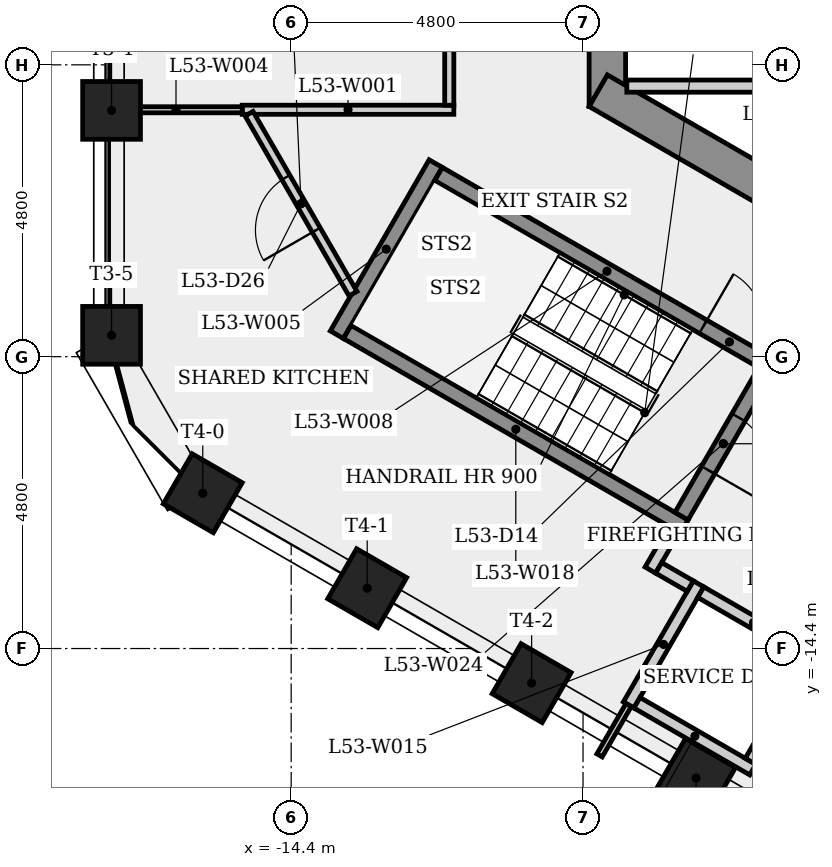
"""IFC4 building model, lengths in metres.
Left out: names, types, materials, properties, quantities, classifications, styles, units other than length and angle.
Written with IfcOpenShell. Run it as: python <this file> out.ifc"""

import sys

from ifc_helpers import new_model, si_unit, direction, frame, frame_2d, origin, origin_2d, place, context, subcontext, project, spatial, rectangle, extrude, element, fill, save


model = new_model("IFC4")
c1 = context("Model", 3, precision=1e-05, world=origin(), true_north=direction((0.0, 1.0)))
c2 = subcontext(c1, "Body", "Model", "MODEL_VIEW")
j1 = project(units=[si_unit("LENGTHUNIT", "METRE"), si_unit("PLANEANGLEUNIT", "RADIAN")], contexts=[c1])
p1 = place(None, origin())
s1 = spatial("IfcSite", under=j1, at=p1, CompositionType="ELEMENT")
p2 = place(p1, origin())
s2 = spatial("IfcBuilding", under=s1, at=p2, CompositionType="ELEMENT")
p3 = place(p2, frame((0.0, 0.0, 198.7)))
s3 = spatial("IfcBuildingStorey", under=s2, at=p3, CompositionType="ELEMENT", Elevation=198.7)
p4 = place(p3, frame((-9.2, 5.485, 0.0), z_axis=(0.0, 0.0, 1.0), x_axis=(0.0, -1.0, 0.0)))
e1 = element("IfcWall", 1, at=p4, inside=s3, PredefinedType="SHEAR", context=c2, shape_type="SweptSolid", body=[
    extrude(rectangle(XDim=10.97, YDim=0.6, at=frame_2d((5.485, 0.0))), origin(), (0.0, 0.0, 1.0), 3.4),
])
p5 = place(p4, frame((8.516, 0.0, 0.0)))
e2 = element("IfcOpeningElement", 2, at=p5, cuts=e1, PredefinedType="OPENING", context=c2, shape_type="SweptSolid", body=[
    extrude(rectangle(XDim=0.9, YDim=2.1, at=frame_2d((0.45, 1.05))), frame((0.0, 0.31, 0.0), z_axis=(0.0, -1.0, 0.0), x_axis=(1.0, 0.0, 0.0)), (0.0, 0.0, 1.0), 0.62),
])
p6 = place(p4, frame((4.685, 0.0, 0.0)))
e3 = element("IfcOpeningElement", 3, at=p6, cuts=e1, PredefinedType="OPENING", context=c2, shape_type="SweptSolid", body=[
    extrude(rectangle(XDim=1.6, YDim=2.1, at=frame_2d((0.8, 1.05))), frame((0.0, 0.31, 0.0), z_axis=(0.0, -1.0, 0.0), x_axis=(1.0, 0.0, 0.0)), (0.0, 0.0, 1.0), 0.62),
])
p7 = place(p3, frame((-9.35, -5.225, 0.0), z_axis=(0.0, 0.0, 1.0), x_axis=(0.866023993627, -0.500002442456, 0.0)))
e4 = element("IfcWall", 4, at=p7, inside=s3, PredefinedType="SHEAR", context=c2, shape_type="SweptSolid", body=[
    extrude(rectangle(XDim=10.97, YDim=0.6, at=frame_2d((5.485, 0.0))), origin(), (0.0, 0.0, 1.0), 3.4),
])
p8 = place(p7, frame((3.084, 0.0, 0.0)))
e5 = element("IfcOpeningElement", 5, at=p8, cuts=e4, PredefinedType="OPENING", context=c2, shape_type="SweptSolid", body=[
    extrude(rectangle(XDim=0.9, YDim=2.1, at=frame_2d((0.45, 1.05))), frame((0.0, 0.31, 0.0), z_axis=(0.0, -1.0, 0.0), x_axis=(1.0, 0.0, 0.0)), (0.0, 0.0, 1.0), 0.62),
])
p9 = place(p7, frame((8.21, 0.0, 0.0)))
e6 = element("IfcOpeningElement", 6, at=p9, cuts=e4, PredefinedType="OPENING", context=c2, shape_type="SweptSolid", body=[
    extrude(rectangle(XDim=0.9, YDim=2.1, at=frame_2d((0.45, 1.05))), frame((0.0, 0.31, 0.0), z_axis=(0.0, -1.0, 0.0), x_axis=(1.0, 0.0, 0.0)), (0.0, 0.0, 1.0), 0.62),
])
for number, where, z_axis, x_axis in (
    (7, (-17.354, -5.549, 0.0), (0.0, 0.0, 1.0), (-1.0, 0.0, 0.0)),
    (8, (-17.354, -9.249, 0.0), (0.0, 0.0, 1.0), (-1.0, 0.0, 0.0)),
    (9, (-15.854, -11.847, 0.0), (0.0, 0.0, 1.0), (-0.5, -0.866, 0.0)),
    (10, (-13.15, -13.408, 0.0), (0.0, 0.0, 1.0), (-0.5, -0.866, 0.0)),
    (11, (-10.445, -14.969, 0.0), (0.0, 0.0, 1.0), (-0.5, -0.866, 0.0)),
    (12, (-7.741, -16.531, 0.0), (0.0, 0.0, 1.0), (-0.5, -0.866, 0.0)),
):
    element("IfcColumn", number, at=place(p3, frame(where, z_axis=z_axis, x_axis=x_axis)), inside=s3, PredefinedType="COLUMN", context=c2, shape_type="SweptSolid", body=[
        extrude(rectangle(XDim=0.95, YDim=0.95, at=origin_2d()), origin(), (0.0, 0.0, 1.0), 3.4),
    ])
p10 = place(p3, frame((-15.205, -5.539, 0.0), z_axis=(0.0, 0.0, 1.0), x_axis=(1.0, 0.0, 0.0)))
e13 = element("IfcWall", 13, at=p10, inside=s3, PredefinedType="PARTITIONING", context=c2, shape_type="SweptSolid", body=[
    extrude(rectangle(XDim=3.48, YDim=0.15, at=frame_2d((1.74, 0.0))), origin(), (0.0, 0.0, 1.0), 3.0),
])
p11 = place(p3, frame((-15.205, -5.539, 0.0), z_axis=(0.0, 0.0, 1.0), x_axis=(-1.0, 0.0, 0.0)))
e14 = element("IfcWall", 14, at=p11, inside=s3, PredefinedType="PARTITIONING", context=c2, shape_type="SweptSolid", body=[
    extrude(rectangle(XDim=2.179, YDim=0.1, at=frame_2d((1.089, 0.0))), origin(), (0.0, 0.0, 1.0), 3.0),
])
p12 = place(p3, frame((-13.648, -9.239, 0.0), z_axis=(0.0, 0.0, 1.0), x_axis=(0.500017246033, 0.866015446554, 0.0)))
e15 = element("IfcWall", 15, at=p12, inside=s3, PredefinedType="SHEAR", context=c2, shape_type="SweptSolid", body=[
    extrude(rectangle(XDim=3.25, YDim=0.25, at=frame_2d((1.625, 0.0))), origin(), (0.0, 0.0, 1.0), 3.0),
])
p13 = place(p3, frame((-13.383, -8.564, 0.0), z_axis=(0.0, 0.0, 1.0), x_axis=(-0.499980071345, 0.866036909293, 0.0)))
e16 = element("IfcWall", 16, at=p13, inside=s3, PredefinedType="PARTITIONING", context=c2, shape_type="SweptSolid", body=[
    extrude(rectangle(XDim=3.418, YDim=0.15, at=frame_2d((1.709, 0.0))), origin(), (0.0, 0.0, 1.0), 3.0),
])
p14 = place(p13, frame((1.209, 0.0, 0.0)))
e17 = element("IfcOpeningElement", 17, at=p14, cuts=e16, PredefinedType="OPENING", context=c2, shape_type="SweptSolid", body=[
    extrude(rectangle(XDim=1.0, YDim=2.1, at=frame_2d((0.5, 1.05))), frame((0.0, 0.085, 0.0), z_axis=(0.0, -1.0, 0.0), x_axis=(1.0, 0.0, 0.0)), (0.0, 0.0, 1.0), 0.17),
])
p15 = place(p3, frame((-11.977, -6.595, 0.0), z_axis=(0.0, 0.0, 1.0), x_axis=(0.866025499775, -0.499999833739, 0.0)))
e18 = element("IfcWall", 18, at=p15, inside=s3, PredefinedType="SHEAR", context=c2, shape_type="SweptSolid", body=[
    extrude(rectangle(XDim=6.4, YDim=0.25, at=frame_2d((3.2, 0.0))), origin(), (0.0, 0.0, 1.0), 3.0),
])
p16 = place(p15, frame((5.025, 0.0, 0.0)))
e19 = element("IfcOpeningElement", 19, at=p16, cuts=e18, PredefinedType="OPENING", context=c2, shape_type="SweptSolid", body=[
    extrude(rectangle(XDim=1.0, YDim=2.1, at=frame_2d((0.5, 1.05))), frame((0.0, 0.135, 0.0), z_axis=(0.0, -1.0, 0.0), x_axis=(1.0, 0.0, 0.0)), (0.0, 0.0, 1.0), 0.27),
])
p17 = place(p3, frame((-11.8, -5.464, 0.0), z_axis=(0.0, 0.0, 1.0), x_axis=(0.0, 1.0, 0.0)))
e20 = element("IfcWall", 20, at=p17, inside=s3, PredefinedType="PARTITIONING", context=c2, shape_type="SweptSolid", body=[
    extrude(rectangle(XDim=11.078, YDim=0.15, at=frame_2d((5.539, 0.0))), origin(), (0.0, 0.0, 1.0), 3.0),
])
p18 = place(p17, frame((4.986, 0.0, 0.0)))
e21 = element("IfcOpeningElement", 21, at=p18, cuts=e20, PredefinedType="OPENING", context=c2, shape_type="SweptSolid", body=[
    extrude(rectangle(XDim=1.0, YDim=2.1, at=frame_2d((0.5, 1.05))), frame((0.0, 0.085, 0.0), z_axis=(0.0, -1.0, 0.0), x_axis=(1.0, 0.0, 0.0)), (0.0, 0.0, 1.0), 0.17),
])
p19 = place(p3, frame((-8.88, -5.15, 0.0), z_axis=(0.0, 0.0, 1.0), x_axis=(1.0, 0.0, 0.0)))
e22 = element("IfcWall", 22, at=p19, inside=s3, PredefinedType="PARTITIONING", context=c2, shape_type="SweptSolid", body=[
    extrude(rectangle(XDim=11.205, YDim=0.2, at=frame_2d((5.603, 0.0))), origin(), (0.0, 0.0, 1.0), 3.0),
])
p20 = place(p3, frame((-8.85, -15.329, 0.0), z_axis=(0.0, 0.0, 1.0), x_axis=(0.500077740698, 0.865980515519, 0.0)))
e23 = element("IfcWall", 23, at=p20, inside=s3, PredefinedType="PLUMBINGWALL", context=c2, shape_type="SweptSolid", body=[
    extrude(rectangle(XDim=2.3, YDim=0.2, at=frame_2d((1.15, 0.0))), origin(), (0.0, 0.0, 1.0), 3.0),
])
p21 = place(p3, frame((-8.85, -15.329, 0.0), z_axis=(0.0, 0.0, 1.0), x_axis=(-0.499950501706, -0.866053979752, 0.0)))
e24 = element("IfcWall", 24, at=p21, inside=s3, PredefinedType="PARTITIONING", context=c2, shape_type="SweptSolid", body=[
    extrude(rectangle(XDim=0.958, YDim=0.1, at=frame_2d((0.479, 0.0))), origin(), (0.0, 0.0, 1.0), 3.0),
])
p22 = place(p3, frame((-8.493, -13.11, 0.0), z_axis=(0.0, 0.0, 1.0), x_axis=(0.500067724834, 0.865986299303, 0.0)))
e25 = element("IfcWall", 25, at=p22, inside=s3, PredefinedType="PARTITIONING", context=c2, shape_type="SweptSolid", body=[
    extrude(rectangle(XDim=0.775, YDim=0.2, at=frame_2d((0.388, 0.0))), origin(), (0.0, 0.0, 1.0), 3.0),
])
p23 = place(p3, frame((-7.935, -12.393, 0.0), z_axis=(0.0, 0.0, 1.0), x_axis=(-0.866025499775, 0.499999833739, 0.0)))
e26 = element("IfcWall", 26, at=p23, inside=s3, PredefinedType="SHEAR", context=c2, shape_type="SweptSolid", body=[
    extrude(rectangle(XDim=6.4, YDim=0.25, at=frame_2d((3.2, 0.0))), origin(), (0.0, 0.0, 1.0), 3.0),
])
p24 = place(p3, frame((-7.836, -13.373, 0.0), z_axis=(0.0, 0.0, 1.0), x_axis=(-0.866232998003, 0.499640263761, 0.0)))
e27 = element("IfcWall", 27, at=p24, inside=s3, PredefinedType="PARTITIONING", context=c2, shape_type="SweptSolid", body=[
    extrude(rectangle(XDim=0.6, YDim=0.2, at=frame_2d((0.3, 0.0))), origin(), (0.0, 0.0, 1.0), 3.0),
])
p25 = place(p3, frame((-6.808, -16.392, 0.0), z_axis=(0.0, 0.0, 1.0), x_axis=(-0.866008176907, 0.50002983664, 0.0)))
e28 = element("IfcWall", 28, at=p25, inside=s3, PredefinedType="PLUMBINGWALL", context=c2, shape_type="SweptSolid", body=[
    extrude(rectangle(XDim=2.2, YDim=0.2, at=frame_2d((1.1, 0.0))), origin(), (0.0, 0.0, 1.0), 3.0),
])
p26 = place(p3, frame((-6.605, -9.841, 0.0), z_axis=(0.0, 0.0, 1.0), x_axis=(-0.499996545922, -0.866027397988, 0.0)))
e29 = element("IfcWall", 29, at=p26, inside=s3, PredefinedType="SHEAR", context=c2, shape_type="SweptSolid", body=[
    extrude(rectangle(XDim=2.75, YDim=0.25, at=frame_2d((1.375, 0.0))), origin(), (0.0, 0.0, 1.0), 3.0),
])
p27 = place(p26, frame((0.875, 0.0, 0.0)))
e30 = element("IfcOpeningElement", 30, at=p27, cuts=e29, PredefinedType="OPENING", context=c2, shape_type="SweptSolid", body=[
    extrude(rectangle(XDim=1.0, YDim=2.1, at=frame_2d((0.5, 1.05))), frame((0.0, 0.135, 0.0), z_axis=(0.0, -1.0, 0.0), x_axis=(1.0, 0.0, 0.0)), (0.0, 0.0, 1.0), 0.27),
])
p28 = place(p3, frame((-5.795, -14.437, 0.0), z_axis=(0.0, 0.0, 1.0), x_axis=(-0.500027713859, -0.866009402589, 0.0)))
e31 = element("IfcWall", 31, at=p28, inside=s3, PredefinedType="PLUMBINGWALL", context=c2, shape_type="SweptSolid", body=[
    extrude(rectangle(XDim=2.1, YDim=0.2, at=frame_2d((1.05, 0.0))), origin(), (0.0, 0.0, 1.0), 3.0),
])
p29 = place(p3, frame((-5.931, -14.473, 0.0), z_axis=(0.0, 0.0, 1.0), x_axis=(-0.866041268327, 0.499972520799, 0.0)))
e32 = element("IfcWall", 32, at=p29, inside=s3, PredefinedType="PLUMBINGWALL", context=c2, shape_type="SweptSolid", body=[
    extrude(rectangle(XDim=2.0, YDim=0.2, at=frame_2d((1.0, 0.0))), origin(), (0.0, 0.0, 1.0), 3.0),
])
p30 = place(p16, origin())
e33 = element("IfcDoor", 33, at=p30, inside=s3, OperationType="SINGLE_SWING_LEFT", PredefinedType="DOOR", context=c2, shape_type="SweptSolid", body=[
    extrude(rectangle(XDim=1.0, YDim=2.1, at=frame_2d((0.5, 1.05))), frame((0.0, 0.025, 0.0), z_axis=(0.0, -1.0, 0.0), x_axis=(1.0, 0.0, 0.0)), (0.0, 0.0, 1.0), 0.05),
])
fill(e19, e33)
p31 = place(p27, origin())
e34 = element("IfcDoor", 34, at=p31, inside=s3, OperationType="SINGLE_SWING_RIGHT", PredefinedType="DOOR", context=c2, shape_type="SweptSolid", body=[
    extrude(rectangle(XDim=1.0, YDim=2.1, at=frame_2d((0.5, 1.05))), frame((0.0, 0.025, 0.0), z_axis=(0.0, -1.0, 0.0), x_axis=(1.0, 0.0, 0.0)), (0.0, 0.0, 1.0), 0.05),
])
fill(e30, e34)
p32 = place(p14, origin())
e35 = element("IfcDoor", 35, at=p32, inside=s3, OperationType="SINGLE_SWING_LEFT", PredefinedType="DOOR", context=c2, shape_type="SweptSolid", body=[
    extrude(rectangle(XDim=1.0, YDim=2.1, at=frame_2d((0.5, 1.05))), frame((0.0, 0.025, 0.0), z_axis=(0.0, -1.0, 0.0), x_axis=(1.0, 0.0, 0.0)), (0.0, 0.0, 1.0), 0.05),
])
fill(e17, e35)
save(model, sys.argv[1])
